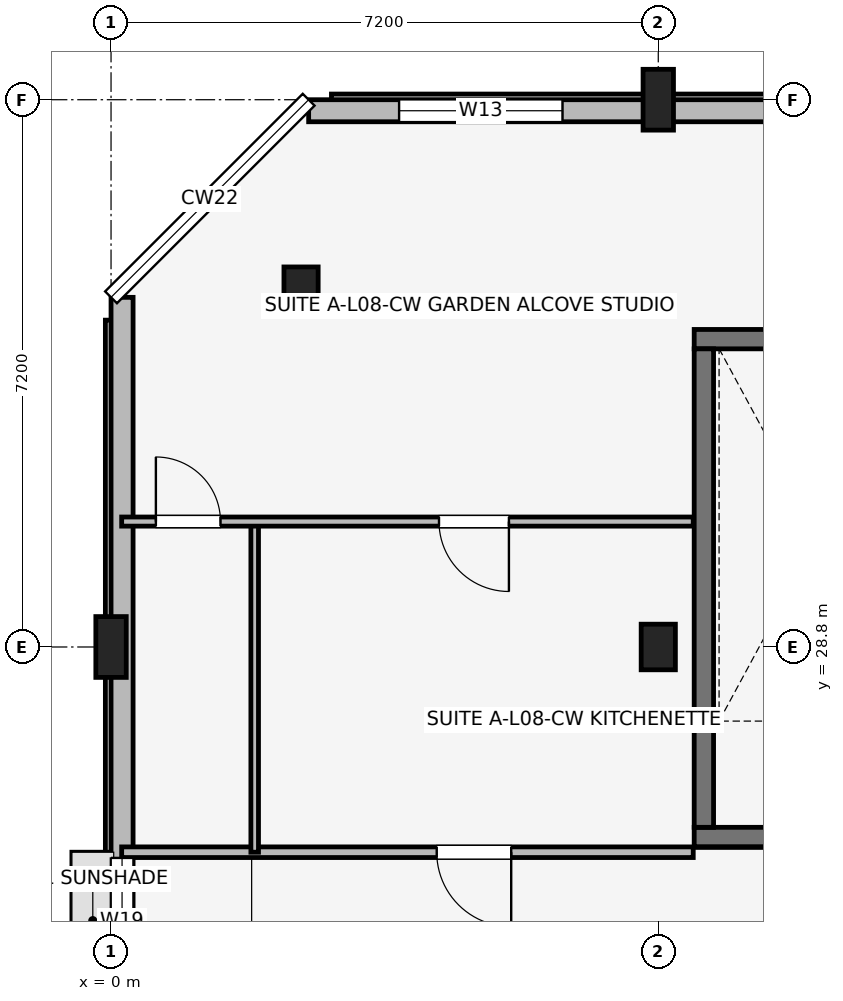
"""IFC4 building model, lengths in metres.
Left out: names, types, materials, properties, quantities, classifications, styles, units other than length and angle.
Written with IfcOpenShell. Run it as: python <this file> out.ifc"""

import sys

from ifc_helpers import new_model, si_unit, direction, frame, frame_2d, origin, origin_2d, place, context, subcontext, project, spatial, rectangle, extrude, element, fill, save


model = new_model("IFC4")
c1 = context("Model", 3, precision=1e-05, world=origin(), true_north=direction((0.0, 1.0)))
c2 = subcontext(c1, "Body", "Model", "MODEL_VIEW")
j1 = project(units=[si_unit("LENGTHUNIT", "METRE"), si_unit("PLANEANGLEUNIT", "RADIAN")], contexts=[c1])
p1 = place(None, origin())
s1 = spatial("IfcSite", under=j1, at=p1, CompositionType="ELEMENT")
p2 = place(p1, origin())
s2 = spatial("IfcBuilding", under=s1, at=p2, CompositionType="ELEMENT")
p3 = place(p2, frame((0.0, 0.0, 27.6)))
s3 = spatial("IfcBuildingStorey", under=s2, at=p3, CompositionType="ELEMENT", Elevation=27.6)
p4 = place(p3, frame((0.0, 28.8, 0.0), z_axis=(0.0, 0.0, 1.0), x_axis=(1.0, 0.0, 0.0)))
e1 = element("IfcColumn", 1, at=p4, inside=s3, PredefinedType="COLUMN", context=c2, shape_type="SweptSolid", body=[
    extrude(rectangle(XDim=0.4, YDim=0.8, at=origin_2d()), origin(), (0.0, 0.0, 1.0), 3.15),
])
for number, where, z_axis, x_axis in (
    (2, (2.5, 33.5, 0.0), (0.0, 0.0, 1.0), (1.0, 0.0, 0.0)),
    (3, (7.2, 28.8, 0.0), (0.0, 0.0, 1.0), (1.0, 0.0, 0.0)),
):
    element("IfcColumn", number, at=place(p3, frame(where, z_axis=z_axis, x_axis=x_axis)), inside=s3, PredefinedType="COLUMN", context=c2, shape_type="SweptSolid", body=[
        extrude(rectangle(XDim=0.45, YDim=0.6, at=origin_2d()), origin(), (0.0, 0.0, 1.0), 3.15),
    ])
p5 = place(p3, frame((7.2, 36.0, 0.0), z_axis=(0.0, 0.0, 1.0), x_axis=(1.0, 0.0, 0.0)))
e4 = element("IfcColumn", 4, at=p5, inside=s3, PredefinedType="COLUMN", context=c2, shape_type="SweptSolid", body=[
    extrude(rectangle(XDim=0.4, YDim=0.8, at=origin_2d()), origin(), (0.0, 0.0, 1.0), 3.15),
])
p6 = place(p3, frame((7.673, 26.3, 0.0), z_axis=(0.0, 0.0, 1.0), x_axis=(1.0, 0.0, 0.0)))
e5 = element("IfcWall", 5, at=p6, inside=s3, PredefinedType="SHEAR", context=c2, shape_type="SweptSolid", body=[
    extrude(rectangle(XDim=3.305, YDim=0.255, at=frame_2d((1.652, 0.0))), origin(), (0.0, 0.0, 1.0), 3.15),
])
p7 = place(p6, frame((2.177, 0.0, 0.0), z_axis=(0.0, 0.0, 1.0), x_axis=(-1.0, 0.0, 0.0)))
e6 = element("IfcOpeningElement", 6, at=p7, cuts=e5, PredefinedType="OPENING", context=c2, shape_type="SweptSolid", body=[
    extrude(rectangle(XDim=1.05, YDim=2.12, at=frame_2d((0.525, 1.06))), frame((0.0, 0.137, 0.0), z_axis=(0.0, -1.0, 0.0), x_axis=(1.0, 0.0, 0.0)), (0.0, 0.0, 1.0), 0.275),
])
p8 = place(p3, frame((7.673, 32.85, 0.0), z_axis=(0.0, 0.0, 1.0), x_axis=(1.0, 0.0, 0.0)))
e7 = element("IfcWall", 7, at=p8, inside=s3, PredefinedType="SHEAR", context=c2, shape_type="SweptSolid", body=[
    extrude(rectangle(XDim=3.305, YDim=0.255, at=frame_2d((1.652, 0.0))), origin(), (0.0, 0.0, 1.0), 3.15),
])
p9 = place(p3, frame((7.8, 26.427, 0.0), z_axis=(0.0, 0.0, 1.0), x_axis=(0.0, 1.0, 0.0)))
e8 = element("IfcWall", 8, at=p9, inside=s3, PredefinedType="SHEAR", context=c2, shape_type="SweptSolid", body=[
    extrude(rectangle(XDim=6.295, YDim=0.255, at=frame_2d((3.147, 0.0))), origin(), (0.0, 0.0, 1.0), 3.15),
])
p10 = place(p3, frame((33.4, 35.855, 0.0), z_axis=(0.0, 0.0, 1.0), x_axis=(-1.0, 0.0, 0.0)))
e9 = element("IfcWall", 9, at=p10, inside=s3, PredefinedType="SOLIDWALL", context=c2, shape_type="SweptSolid", body=[
    extrude(rectangle(XDim=30.8, YDim=0.29, at=frame_2d((15.4, 0.0))), origin(), (0.0, 0.0, 1.0), 2.43),
])
p11 = place(p10, frame((14.825, 0.0, 0.5)))
e10 = element("IfcOpeningElement", 10, at=p11, cuts=e9, PredefinedType="OPENING", context=c2, shape_type="SweptSolid", body=[
    extrude(rectangle(XDim=1.15, YDim=1.68, at=frame_2d((0.575, 0.84))), frame((0.0, 0.155, 0.0), z_axis=(0.0, -1.0, 0.0), x_axis=(1.0, 0.0, 0.0)), (0.0, 0.0, 1.0), 0.31),
])
p12 = place(p10, frame((1.265, 0.0, 0.67)))
e11 = element("IfcOpeningElement", 11, at=p12, cuts=e9, PredefinedType="OPENING", context=c2, shape_type="SweptSolid", body=[
    extrude(rectangle(XDim=2.0, YDim=1.65, at=frame_2d((1.0, 0.825))), frame((0.0, 0.155, 0.0), z_axis=(0.0, -1.0, 0.0), x_axis=(1.0, 0.0, 0.0)), (0.0, 0.0, 1.0), 0.31),
])
p13 = place(p10, frame((27.46, 0.0, 0.67)))
e12 = element("IfcOpeningElement", 12, at=p13, cuts=e9, PredefinedType="OPENING", context=c2, shape_type="SweptSolid", body=[
    extrude(rectangle(XDim=2.15, YDim=1.65, at=frame_2d((1.075, 0.825))), frame((0.0, 0.155, 0.0), z_axis=(0.0, -1.0, 0.0), x_axis=(1.0, 0.0, 0.0)), (0.0, 0.0, 1.0), 0.31),
])
p14 = place(p10, frame((8.805, 0.0, 0.67)))
e13 = element("IfcOpeningElement", 13, at=p14, cuts=e9, PredefinedType="OPENING", context=c2, shape_type="SweptSolid", body=[
    extrude(rectangle(XDim=2.3, YDim=1.65, at=frame_2d((1.15, 0.825))), frame((0.0, 0.155, 0.0), z_axis=(0.0, -1.0, 0.0), x_axis=(1.0, 0.0, 0.0)), (0.0, 0.0, 1.0), 0.31),
])
p15 = place(p10, frame((19.595, 0.0, 0.67)))
e14 = element("IfcOpeningElement", 14, at=p15, cuts=e9, PredefinedType="OPENING", context=c2, shape_type="SweptSolid", body=[
    extrude(rectangle(XDim=2.45, YDim=1.65, at=frame_2d((1.225, 0.825))), frame((0.0, 0.155, 0.0), z_axis=(0.0, -1.0, 0.0), x_axis=(1.0, 0.0, 0.0)), (0.0, 0.0, 1.0), 0.31),
])
p16 = place(p3, frame((0.145, 33.4, 0.0), z_axis=(0.0, 0.0, 1.0), x_axis=(0.0, -1.0, 0.0)))
e15 = element("IfcWall", 15, at=p16, inside=s3, PredefinedType="SOLIDWALL", context=c2, shape_type="SweptSolid", body=[
    extrude(rectangle(XDim=13.4, YDim=0.29, at=frame_2d((6.7, 0.0))), origin(), (0.0, 0.0, 1.0), 2.43),
])
p17 = place(p16, frame((7.375, 0.0, 1.05)))
e16 = element("IfcOpeningElement", 16, at=p17, cuts=e15, PredefinedType="OPENING", context=c2, shape_type="SweptSolid", body=[
    extrude(rectangle(XDim=1.65, YDim=1.15, at=frame_2d((0.825, 0.575))), frame((0.0, 0.155, 0.0), z_axis=(0.0, -1.0, 0.0), x_axis=(1.0, 0.0, 0.0)), (0.0, 0.0, 1.0), 0.31),
])
p18 = place(p16, frame((9.635, 0.0, 0.75)))
e17 = element("IfcOpeningElement", 17, at=p18, cuts=e15, PredefinedType="OPENING", context=c2, shape_type="SweptSolid", body=[
    extrude(rectangle(XDim=1.3, YDim=1.55, at=frame_2d((0.65, 0.775))), frame((0.0, 0.155, 0.0), z_axis=(0.0, -1.0, 0.0), x_axis=(1.0, 0.0, 0.0)), (0.0, 0.0, 1.0), 0.31),
])
p19 = place(p3, frame((0.14, 26.1, 0.0), z_axis=(0.0, 0.0, 1.0), x_axis=(1.0, 0.0, 0.0)))
e18 = element("IfcWall", 18, at=p19, inside=s3, PredefinedType="PARTITIONING", context=c2, shape_type="SweptSolid", body=[
    extrude(rectangle(XDim=7.52, YDim=0.14, at=frame_2d((3.76, 0.0))), origin(), (0.0, 0.0, 1.0), 2.38),
])
p20 = place(p19, frame((5.125, 0.0, 0.0), z_axis=(0.0, 0.0, 1.0), x_axis=(-1.0, 0.0, 0.0)))
e19 = element("IfcOpeningElement", 19, at=p20, cuts=e18, PredefinedType="OPENING", context=c2, shape_type="SweptSolid", body=[
    extrude(rectangle(XDim=0.98, YDim=2.1, at=frame_2d((0.49, 1.05))), frame((0.0, 0.08, 0.0), z_axis=(0.0, -1.0, 0.0), x_axis=(1.0, 0.0, 0.0)), (0.0, 0.0, 1.0), 0.16),
])
p21 = place(p3, frame((1.89, 26.1, 0.0), z_axis=(0.0, 0.0, 1.0), x_axis=(0.0, 1.0, 0.0)))
e20 = element("IfcWall", 20, at=p21, inside=s3, PredefinedType="PARTITIONING", context=c2, shape_type="SweptSolid", body=[
    extrude(rectangle(XDim=4.35, YDim=0.1, at=frame_2d((2.175, 0.0))), origin(), (0.0, 0.0, 1.0), 2.38),
])
p22 = place(p3, frame((0.14, 30.45, 0.0), z_axis=(0.0, 0.0, 1.0), x_axis=(1.0, 0.0, 0.0)))
e21 = element("IfcWall", 21, at=p22, inside=s3, PredefinedType="PARTITIONING", context=c2, shape_type="SweptSolid", body=[
    extrude(rectangle(XDim=7.52, YDim=0.12, at=frame_2d((3.76, 0.0))), origin(), (0.0, 0.0, 1.0), 2.38),
])
p23 = place(p22, frame((0.45, 0.0, 0.0)))
e22 = element("IfcOpeningElement", 22, at=p23, cuts=e21, PredefinedType="OPENING", context=c2, shape_type="SweptSolid", body=[
    extrude(rectangle(XDim=0.85, YDim=2.08, at=frame_2d((0.425, 1.04))), frame((0.0, 0.07, 0.0), z_axis=(0.0, -1.0, 0.0), x_axis=(1.0, 0.0, 0.0)), (0.0, 0.0, 1.0), 0.14),
])
p24 = place(p22, frame((5.095, 0.0, 0.0), z_axis=(0.0, 0.0, 1.0), x_axis=(-1.0, 0.0, 0.0)))
e23 = element("IfcOpeningElement", 23, at=p24, cuts=e21, PredefinedType="OPENING", context=c2, shape_type="SweptSolid", body=[
    extrude(rectangle(XDim=0.92, YDim=2.08, at=frame_2d((0.46, 1.04))), frame((0.0, 0.07, 0.0), z_axis=(0.0, -1.0, 0.0), x_axis=(1.0, 0.0, 0.0)), (0.0, 0.0, 1.0), 0.14),
])
p25 = place(p13, origin())
e24 = element("IfcWindow", 24, at=p25, inside=s3, PartitioningType="SINGLE_PANEL", PredefinedType="WINDOW", context=c2, shape_type="SweptSolid", body=[
    extrude(rectangle(XDim=2.15, YDim=1.65, at=frame_2d((1.075, 0.825))), frame((0.0, 0.03, 0.0), z_axis=(0.0, -1.0, 0.0), x_axis=(1.0, 0.0, 0.0)), (0.0, 0.0, 1.0), 0.06),
])
fill(e12, e24)
p26 = place(p17, origin())
e25 = element("IfcWindow", 25, at=p26, inside=s3, PartitioningType="SINGLE_PANEL", PredefinedType="WINDOW", context=c2, shape_type="SweptSolid", body=[
    extrude(rectangle(XDim=1.65, YDim=1.15, at=frame_2d((0.825, 0.575))), frame((0.0, 0.03, 0.0), z_axis=(0.0, -1.0, 0.0), x_axis=(1.0, 0.0, 0.0)), (0.0, 0.0, 1.0), 0.06),
])
fill(e16, e25)
p27 = place(p20, origin())
e26 = element("IfcDoor", 26, at=p27, inside=s3, OperationType="SINGLE_SWING_RIGHT", PredefinedType="DOOR", context=c2, shape_type="SweptSolid", body=[
    extrude(rectangle(XDim=0.98, YDim=2.1, at=frame_2d((0.49, 1.05))), frame((0.0, 0.025, 0.0), z_axis=(0.0, -1.0, 0.0), x_axis=(1.0, 0.0, 0.0)), (0.0, 0.0, 1.0), 0.05),
])
fill(e19, e26)
p28 = place(p23, origin())
e27 = element("IfcDoor", 27, at=p28, inside=s3, OperationType="SINGLE_SWING_LEFT", PredefinedType="DOOR", context=c2, shape_type="SweptSolid", body=[
    extrude(rectangle(XDim=0.85, YDim=2.08, at=frame_2d((0.425, 1.04))), frame((0.0, 0.025, 0.0), z_axis=(0.0, -1.0, 0.0), x_axis=(1.0, 0.0, 0.0)), (0.0, 0.0, 1.0), 0.05),
])
fill(e22, e27)
p29 = place(p24, origin())
e28 = element("IfcDoor", 28, at=p29, inside=s3, OperationType="SINGLE_SWING_RIGHT", PredefinedType="DOOR", context=c2, shape_type="SweptSolid", body=[
    extrude(rectangle(XDim=0.92, YDim=2.08, at=frame_2d((0.46, 1.04))), frame((0.0, 0.025, 0.0), z_axis=(0.0, -1.0, 0.0), x_axis=(1.0, 0.0, 0.0)), (0.0, 0.0, 1.0), 0.05),
])
fill(e23, e28)
save(model, sys.argv[1])
